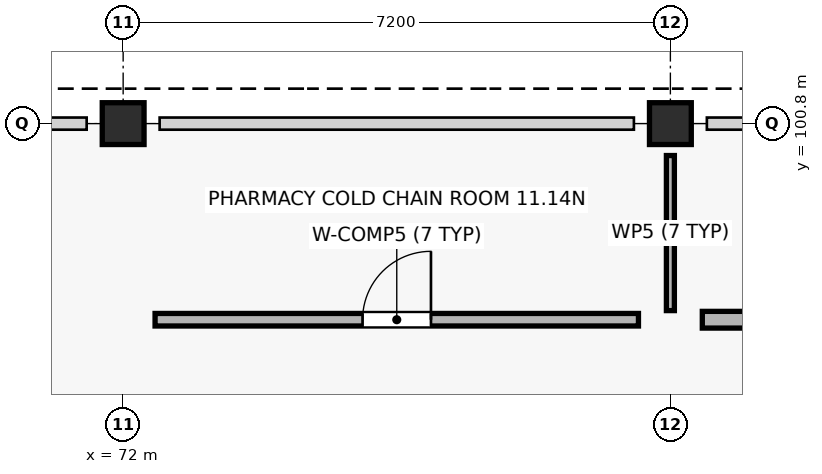
"""IFC4 building model, lengths in metres.
Left out: names, types, materials, properties, quantities, classifications, styles, units other than length and angle.
Written with IfcOpenShell. Run it as: python <this file> out.ifc"""

import sys

from ifc_helpers import new_model, si_unit, direction, frame, frame_2d, origin, origin_2d, place, context, subcontext, project, spatial, rectangle, extrude, element, fill, save


model = new_model("IFC4")
c1 = context("Model", 3, precision=1e-05, world=origin(), true_north=direction((0.0, 1.0)))
c2 = subcontext(c1, "Body", "Model", "MODEL_VIEW")
j1 = project(units=[si_unit("LENGTHUNIT", "METRE"), si_unit("PLANEANGLEUNIT", "RADIAN")], contexts=[c1])
p1 = place(None, origin())
s1 = spatial("IfcSite", under=j1, at=p1, CompositionType="ELEMENT")
p2 = place(p1, origin())
s2 = spatial("IfcBuilding", under=s1, at=p2, CompositionType="ELEMENT")
p3 = place(p2, origin())
s3 = spatial("IfcBuildingStorey", under=s2, at=p3, CompositionType="ELEMENT", Elevation=0.0)
for number, where, z_axis, x_axis in (
    (1, (72.0, 100.8, -0.25), (0.0, 0.0, 1.0), (1.0, 0.0, 0.0)),
    (2, (79.2, 100.8, -0.25), (0.0, 0.0, 1.0), (1.0, 0.0, 0.0)),
):
    element("IfcColumn", number, at=place(p3, frame(where, z_axis=z_axis, x_axis=x_axis)), inside=s3, PredefinedType="COLUMN", context=c2, shape_type="SweptSolid", body=[
        extrude(rectangle(XDim=0.55, YDim=0.55, at=origin_2d()), origin(), (0.0, 0.0, 1.0), 4.75),
    ])
p4 = place(p3, frame((72.42, 98.22, 0.0), z_axis=(0.0, 0.0, 1.0), x_axis=(1.0, 0.0, 0.0)))
e3 = element("IfcWall", 3, at=p4, inside=s3, PredefinedType="PARTITIONING", context=c2, shape_type="SweptSolid", body=[
    extrude(rectangle(XDim=6.36, YDim=0.165, at=frame_2d((3.18, 0.0))), origin(), (0.0, 0.0, 1.0), 3.36),
])
p5 = place(p4, frame((2.73, 0.0, 0.0)))
e4 = element("IfcOpeningElement", 4, at=p5, cuts=e3, PredefinedType="OPENING", context=c2, shape_type="SweptSolid", body=[
    extrude(rectangle(XDim=0.9, YDim=2.04, at=frame_2d((0.45, 1.02))), frame((0.0, 0.093, 0.0), z_axis=(0.0, -1.0, 0.0), x_axis=(1.0, 0.0, 0.0)), (0.0, 0.0, 1.0), 0.185),
])
p6 = place(p3, frame((79.2, 98.34, 0.0), z_axis=(0.0, 0.0, 1.0), x_axis=(0.0, 1.0, 0.0)))
e5 = element("IfcWall", 5, at=p6, inside=s3, PredefinedType="PARTITIONING", context=c2, shape_type="SweptSolid", body=[
    extrude(rectangle(XDim=2.04, YDim=0.105, at=frame_2d((1.02, 0.0))), origin(), (0.0, 0.0, 1.0), 3.36),
])
p7 = place(p3, frame((79.62, 98.22, 0.0), z_axis=(0.0, 0.0, 1.0), x_axis=(1.0, 0.0, 0.0)))
e6 = element("IfcWall", 6, at=p7, inside=s3, PredefinedType="SOLIDWALL", context=c2, shape_type="SweptSolid", body=[
    extrude(rectangle(XDim=6.36, YDim=0.22, at=frame_2d((3.18, 0.0))), origin(), (0.0, 0.0, 1.0), 3.36),
])
p8 = place(p7, frame((2.61, 0.0, 0.0)))
e7 = element("IfcOpeningElement", 7, at=p8, cuts=e6, PredefinedType="OPENING", context=c2, shape_type="SweptSolid", body=[
    extrude(rectangle(XDim=1.14, YDim=2.04, at=frame_2d((0.57, 1.02))), frame((0.0, 0.12, 0.0), z_axis=(0.0, -1.0, 0.0), x_axis=(1.0, 0.0, 0.0)), (0.0, 0.0, 1.0), 0.24),
])
p9 = place(p5, origin())
e8 = element("IfcDoor", 8, at=p9, inside=s3, OperationType="SINGLE_SWING_RIGHT", PredefinedType="DOOR", context=c2, shape_type="SweptSolid", body=[
    extrude(rectangle(XDim=0.9, YDim=2.04, at=frame_2d((0.45, 1.02))), frame((0.0, 0.025, 0.0), z_axis=(0.0, -1.0, 0.0), x_axis=(1.0, 0.0, 0.0)), (0.0, 0.0, 1.0), 0.05),
])
fill(e4, e8)
save(model, sys.argv[1])
